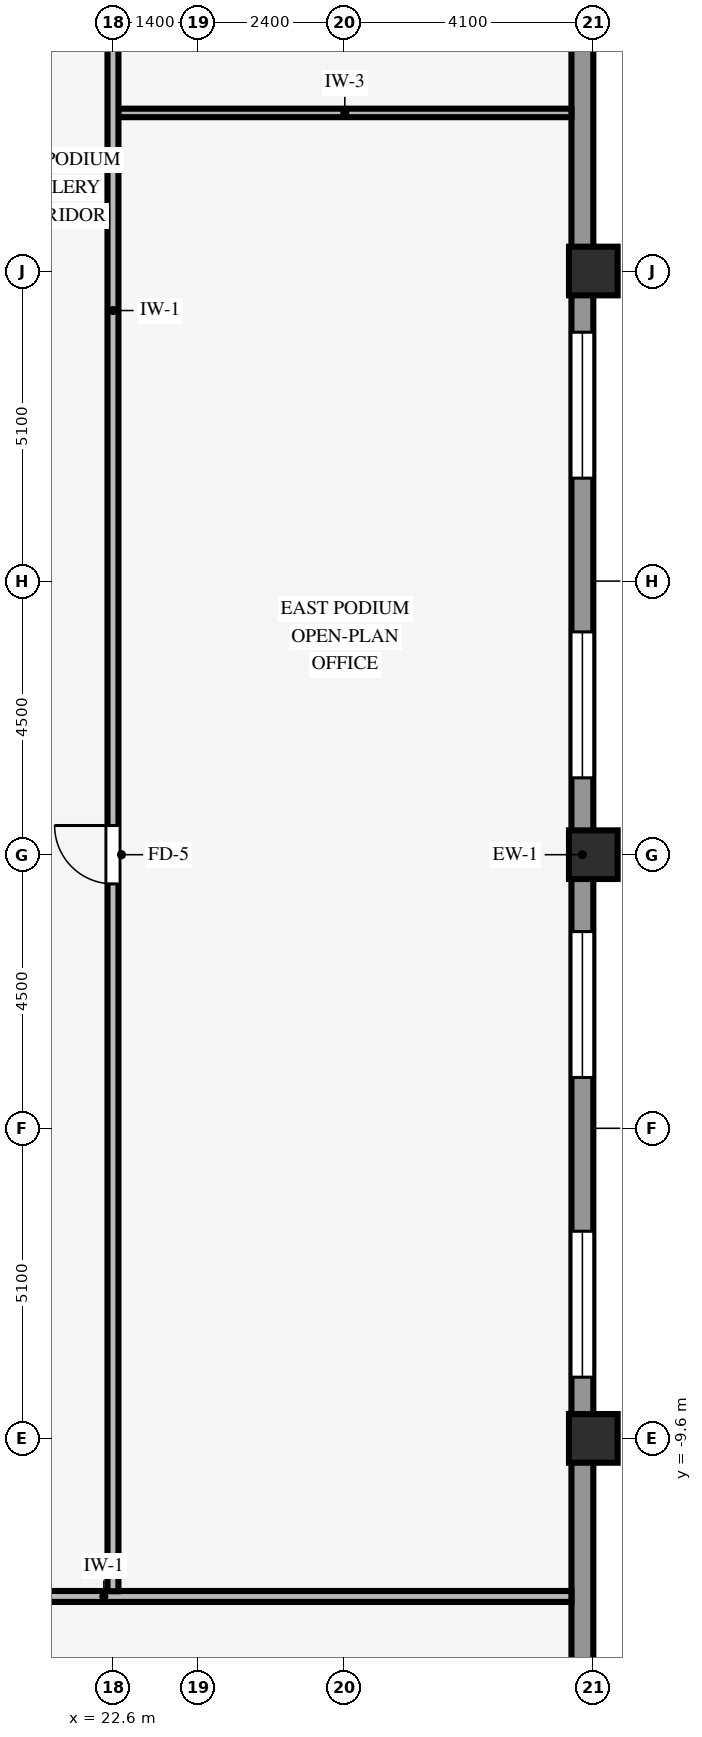
"""IFC4 building model, lengths in metres.
Left out: names, types, materials, properties, quantities, classifications, styles, units other than length and angle.
Written with IfcOpenShell. Run it as: python <this file> out.ifc"""

import sys

from ifc_helpers import new_model, si_unit, direction, frame, frame_2d, origin, origin_2d, place, context, subcontext, project, spatial, rectangle, hollow_rectangle, extrude, source, transform, mapped, element, fill, save


model = new_model("IFC4")
c1 = context("Model", 3, precision=1e-05, world=origin(), true_north=direction((0.0, 1.0)))
c2 = subcontext(c1, "Body", "Model", "MODEL_VIEW")
j1 = project(units=[si_unit("LENGTHUNIT", "METRE"), si_unit("PLANEANGLEUNIT", "RADIAN")], contexts=[c1])
p1 = place(None, origin())
s1 = spatial("IfcSite", under=j1, at=p1, CompositionType="ELEMENT")
p2 = place(p1, origin())
s2 = spatial("IfcBuilding", under=s1, at=p2, CompositionType="ELEMENT")
p3 = place(p2, frame((0.0, 0.0, 4.6)))
s3 = spatial("IfcBuildingStorey", under=s2, at=p3, CompositionType="ELEMENT", Elevation=4.6)
for number, where, z_axis, x_axis in (
    (1, (30.5, -9.6, 0.0), (0.0, 0.0, 1.0), (1.0, 0.0, 0.0)),
    (2, (30.5, 0.0, 0.0), (0.0, 0.0, 1.0), (1.0, 0.0, 0.0)),
    (3, (30.5, 9.6, 0.0), (0.0, 0.0, 1.0), (1.0, 0.0, 0.0)),
):
    element("IfcColumn", number, at=place(p3, frame(where, z_axis=z_axis, x_axis=x_axis)), inside=s3, PredefinedType="COLUMN", context=c2, shape_type="SweptSolid", body=[
        extrude(hollow_rectangle(XDim=0.8, YDim=0.8, WallThickness=0.055, InnerFilletRadius=0.055, OuterFilletRadius=0.11, at=origin_2d()), origin(), (0.0, 0.0, 1.0), 4.28),
    ])
p4 = place(p3, frame((30.32, -25.644, 0.0), z_axis=(0.0, 0.0, 1.0), x_axis=(0.0, 1.0, 0.0)))
e4 = element("IfcWall", 4, at=p4, inside=s3, PredefinedType="STANDARD", context=c2, shape_type="SweptSolid", body=[
    extrude(rectangle(XDim=51.288, YDim=0.36, at=frame_2d((25.644, 0.0))), origin(), (0.0, 0.0, 1.0), 3.615),
])
p5 = place(p4, frame((2.264, 0.0, 0.85)))
e5 = element("IfcOpeningElement", 5, at=p5, cuts=e4, PredefinedType="OPENING", context=c2, shape_type="SweptSolid", body=[
    extrude(rectangle(XDim=2.4, YDim=2.45, at=frame_2d((1.2, 1.225))), frame((0.0, 0.19, 0.0), z_axis=(0.0, -1.0, 0.0), x_axis=(1.0, 0.0, 0.0)), (0.0, 0.0, 1.0), 0.38),
])
p6 = place(p4, frame((17.051, 0.0, 0.85)))
e6 = element("IfcOpeningElement", 6, at=p6, cuts=e4, PredefinedType="OPENING", context=c2, shape_type="SweptSolid", body=[
    extrude(rectangle(XDim=2.4, YDim=2.45, at=frame_2d((1.2, 1.225))), frame((0.0, 0.19, 0.0), z_axis=(0.0, -1.0, 0.0), x_axis=(1.0, 0.0, 0.0)), (0.0, 0.0, 1.0), 0.38),
])
p7 = place(p4, frame((21.979, 0.0, 0.85)))
e7 = element("IfcOpeningElement", 7, at=p7, cuts=e4, PredefinedType="OPENING", context=c2, shape_type="SweptSolid", body=[
    extrude(rectangle(XDim=2.4, YDim=2.45, at=frame_2d((1.2, 1.225))), frame((0.0, 0.19, 0.0), z_axis=(0.0, -1.0, 0.0), x_axis=(1.0, 0.0, 0.0)), (0.0, 0.0, 1.0), 0.38),
])
p8 = place(p4, frame((26.908, 0.0, 0.85)))
e8 = element("IfcOpeningElement", 8, at=p8, cuts=e4, PredefinedType="OPENING", context=c2, shape_type="SweptSolid", body=[
    extrude(rectangle(XDim=2.4, YDim=2.45, at=frame_2d((1.2, 1.225))), frame((0.0, 0.19, 0.0), z_axis=(0.0, -1.0, 0.0), x_axis=(1.0, 0.0, 0.0)), (0.0, 0.0, 1.0), 0.38),
])
p9 = place(p4, frame((31.837, 0.0, 0.85)))
e9 = element("IfcOpeningElement", 9, at=p9, cuts=e4, PredefinedType="OPENING", context=c2, shape_type="SweptSolid", body=[
    extrude(rectangle(XDim=2.4, YDim=2.45, at=frame_2d((1.2, 1.225))), frame((0.0, 0.19, 0.0), z_axis=(0.0, -1.0, 0.0), x_axis=(1.0, 0.0, 0.0)), (0.0, 0.0, 1.0), 0.38),
])
p10 = place(p4, frame((46.624, 0.0, 0.85)))
e10 = element("IfcOpeningElement", 10, at=p10, cuts=e4, PredefinedType="OPENING", context=c2, shape_type="SweptSolid", body=[
    extrude(rectangle(XDim=2.4, YDim=2.45, at=frame_2d((1.2, 1.225))), frame((0.0, 0.19, 0.0), z_axis=(0.0, -1.0, 0.0), x_axis=(1.0, 0.0, 0.0)), (0.0, 0.0, 1.0), 0.38),
])
p11 = place(p3, frame((7.86, -12.2, 0.0), z_axis=(0.0, 0.0, 1.0), x_axis=(1.0, 0.0, 0.0)))
e11 = element("IfcWall", 11, at=p11, inside=s3, PredefinedType="PARTITIONING", context=c2, shape_type="SweptSolid", body=[
    extrude(rectangle(XDim=22.28, YDim=0.18, at=frame_2d((11.14, 0.0))), origin(), (0.0, 0.0, 1.0), 4.27),
])
p12 = place(p11, frame((5.49, 0.0, 0.0)))
e12 = element("IfcOpeningElement", 12, at=p12, cuts=e11, PredefinedType="OPENING", context=c2, shape_type="SweptSolid", body=[
    extrude(rectangle(XDim=0.96, YDim=2.1, at=frame_2d((0.48, 1.05))), frame((0.0, 0.1, 0.0), z_axis=(0.0, -1.0, 0.0), x_axis=(1.0, 0.0, 0.0)), (0.0, 0.0, 1.0), 0.2),
])
p13 = place(p3, frame((22.686, 12.2, 0.0), z_axis=(0.0, 0.0, 1.0), x_axis=(1.0, 0.0, 0.0)))
e13 = element("IfcWall", 13, at=p13, inside=s3, PredefinedType="PARTITIONING", context=c2, shape_type="SweptSolid", body=[
    extrude(rectangle(XDim=7.454, YDim=0.14, at=frame_2d((3.727, 0.0))), origin(), (0.0, 0.0, 1.0), 4.27),
])
p14 = place(p3, frame((22.6, -12.114, 0.0), z_axis=(0.0, 0.0, 1.0), x_axis=(0.0, 1.0, 0.0)))
e14 = element("IfcWall", 14, at=p14, inside=s3, PredefinedType="PARTITIONING", context=c2, shape_type="SweptSolid", body=[
    extrude(rectangle(XDim=37.919, YDim=0.18, at=frame_2d((18.959, 0.0))), origin(), (0.0, 0.0, 1.0), 4.27),
])
p15 = place(p14, frame((11.634, 0.0, 0.0)))
e15 = element("IfcOpeningElement", 15, at=p15, cuts=e14, PredefinedType="OPENING", context=c2, shape_type="SweptSolid", body=[
    extrude(rectangle(XDim=0.96, YDim=2.1, at=frame_2d((0.48, 1.05))), frame((0.0, 0.1, 0.0), z_axis=(0.0, -1.0, 0.0), x_axis=(1.0, 0.0, 0.0)), (0.0, 0.0, 1.0), 0.2),
])
p16 = place(p14, frame((29.534, 0.0, 0.0)))
e16 = element("IfcOpeningElement", 16, at=p16, cuts=e14, PredefinedType="OPENING", context=c2, shape_type="SweptSolid", body=[
    extrude(rectangle(XDim=0.96, YDim=2.1, at=frame_2d((0.48, 1.05))), frame((0.0, 0.1, 0.0), z_axis=(0.0, -1.0, 0.0), x_axis=(1.0, 0.0, 0.0)), (0.0, 0.0, 1.0), 0.2),
])
m1 = source(origin(), c2, "Body", "SweptSolid", [
    extrude(rectangle(XDim=2.4, YDim=2.45, at=frame_2d((1.2, 1.225))), frame((0.0, 0.03, 0.0), z_axis=(0.0, -1.0, 0.0), x_axis=(1.0, 0.0, 0.0)), (0.0, 0.0, 1.0), 0.06),
])
p17 = place(p6, origin())
e17 = element("IfcWindow", 17, at=p17, inside=s3, PartitioningType="SINGLE_PANEL", PredefinedType="WINDOW", context=c2, shape_type="MappedRepresentation", body=[
    mapped(m1, transform((0.0, 0.0, 0.0), scale=1.0)),
])
fill(e6, e17)
p18 = place(p7, origin())
e18 = element("IfcWindow", 18, at=p18, inside=s3, PartitioningType="SINGLE_PANEL", PredefinedType="WINDOW", context=c2, shape_type="MappedRepresentation", body=[
    mapped(m1, transform((0.0, 0.0, 0.0), scale=1.0)),
])
fill(e7, e18)
p19 = place(p8, origin())
e19 = element("IfcWindow", 19, at=p19, inside=s3, PartitioningType="SINGLE_PANEL", PredefinedType="WINDOW", context=c2, shape_type="MappedRepresentation", body=[
    mapped(m1, transform((0.0, 0.0, 0.0), scale=1.0)),
])
fill(e8, e19)
p20 = place(p9, origin())
e20 = element("IfcWindow", 20, at=p20, inside=s3, PartitioningType="SINGLE_PANEL", PredefinedType="WINDOW", context=c2, shape_type="MappedRepresentation", body=[
    mapped(m1, transform((0.0, 0.0, 0.0), scale=1.0)),
])
fill(e9, e20)
m2 = source(origin(), c2, "Body", "SweptSolid", [
    extrude(rectangle(XDim=0.96, YDim=2.1, at=frame_2d((0.48, 1.05))), frame((0.0, 0.025, 0.0), z_axis=(0.0, -1.0, 0.0), x_axis=(1.0, 0.0, 0.0)), (0.0, 0.0, 1.0), 0.05),
])
p21 = place(p15, origin())
e21 = element("IfcDoor", 21, at=p21, inside=s3, OperationType="SINGLE_SWING_RIGHT", PredefinedType="DOOR", context=c2, shape_type="MappedRepresentation", body=[
    mapped(m2, transform((0.0, 0.0, 0.0), scale=1.0)),
])
fill(e15, e21)
save(model, sys.argv[1])
